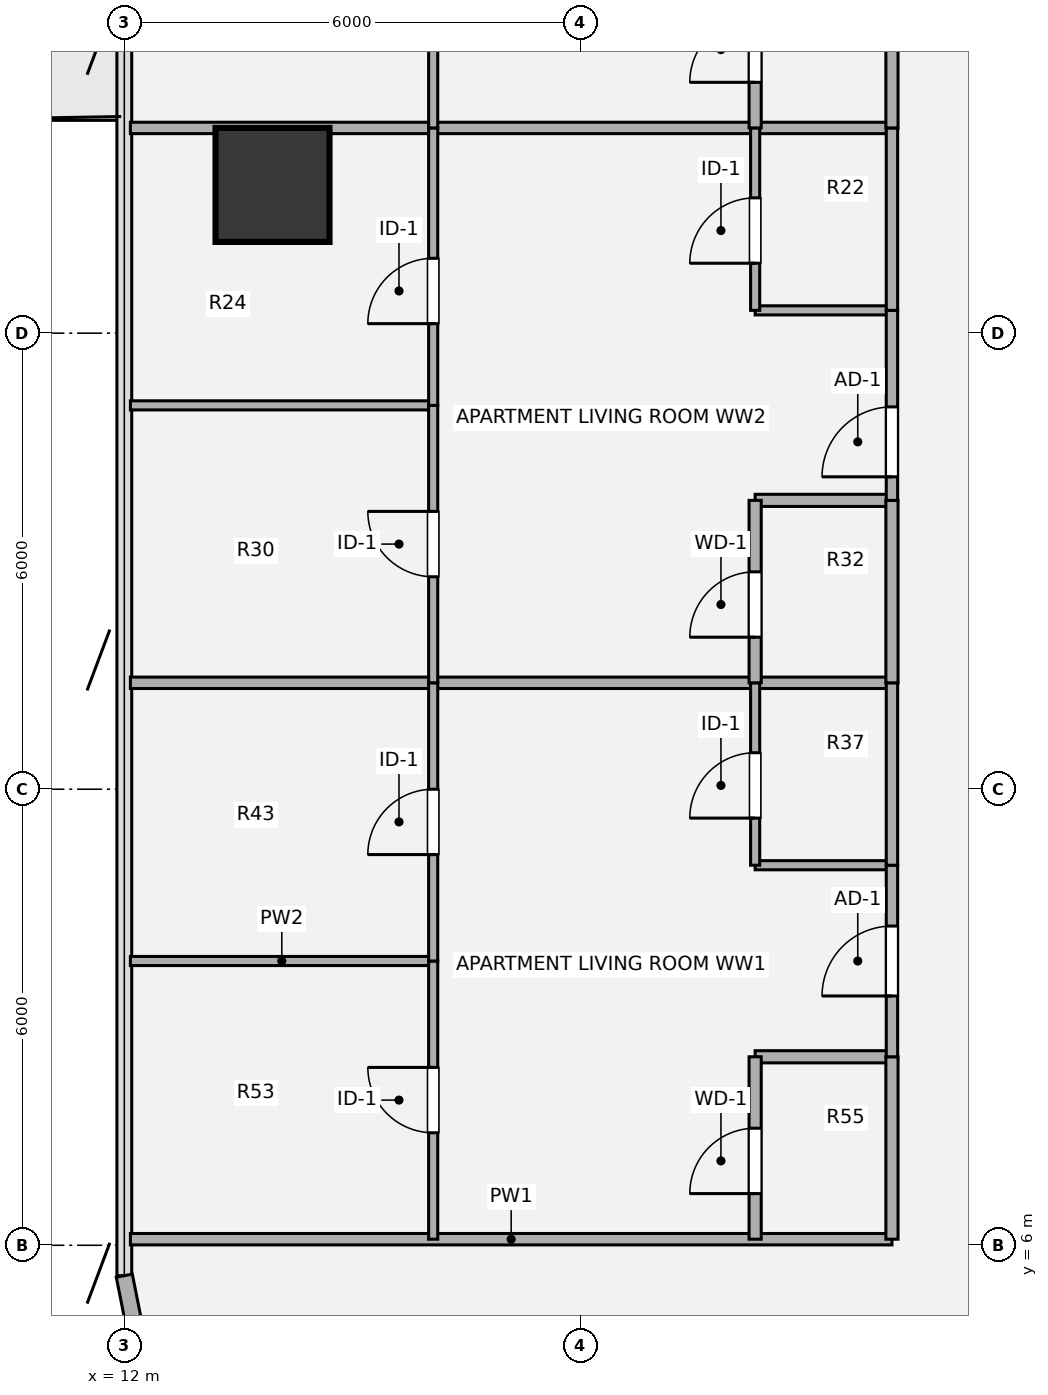
"""IFC4 building model, lengths in metres.
Left out: names, types, materials, properties, quantities, classifications, styles, units other than length and angle.
Written with IfcOpenShell. Run it as: python <this file> out.ifc"""

import sys

from ifc_helpers import new_model, si_unit, direction, frame, frame_2d, origin, origin_2d, place, context, subcontext, project, spatial, rectangle, hollow_circle, extrude, source, transform, mapped, element, fill, save


model = new_model("IFC4")
c1 = context("Model", 3, precision=1e-05, world=origin(), true_north=direction((0.0, 1.0)))
c2 = subcontext(c1, "Body", "Model", "MODEL_VIEW")
j1 = project(units=[si_unit("LENGTHUNIT", "METRE"), si_unit("PLANEANGLEUNIT", "RADIAN")], contexts=[c1])
p1 = place(None, origin())
s1 = spatial("IfcSite", under=j1, at=p1, CompositionType="ELEMENT")
p2 = place(p1, origin())
s2 = spatial("IfcBuilding", under=s1, at=p2, CompositionType="ELEMENT")
p3 = place(p2, frame((0.0, 0.0, 30.78)))
s3 = spatial("IfcBuildingStorey", under=s2, at=p3, CompositionType="ELEMENT", Elevation=30.78)
m1 = source(origin(), c2, "Body", "SweptSolid", [
    extrude(hollow_circle(Radius=0.75, WallThickness=0.05, at=origin_2d()), origin(), (0.0, 0.0, 1.0), 3.78),
])
p4 = place(p3, frame((13.95, 19.95, 0.0), z_axis=(0.0, 0.0, 1.0), x_axis=(1.0, 0.0, 0.0)))
e1 = element("IfcColumn", 1, at=p4, inside=s3, PredefinedType="COLUMN", context=c2, shape_type="MappedRepresentation", body=[
    mapped(m1, transform((0.0, 0.0, 0.0), x_axis=(1.0, 0.0, 0.0), y_axis=(0.0, 1.0, 0.0), z_axis=(0.0, 0.0, 1.0), scale=1.0)),
])
p5 = place(p3, frame((12.244, 4.375, 0.0), z_axis=(0.0, 0.0, 1.0), x_axis=(-0.195138390419, 0.980775717779, 0.0)))
e2 = element("IfcWall", 2, at=p5, inside=s3, PredefinedType="SOLIDWALL", context=c2, shape_type="SweptSolid", body=[
    extrude(rectangle(XDim=1.249, YDim=0.215, at=frame_2d((0.624, 0.0))), origin(), (0.0, 0.0, 1.0), 3.53),
])
p6 = place(p3, frame((12.08, 6.08, 0.0), z_axis=(0.0, 0.0, 1.0), x_axis=(1.0, 0.0, 0.0)))
e3 = element("IfcWall", 3, at=p6, inside=s3, PredefinedType="PARTITIONING", context=c2, shape_type="SweptSolid", body=[
    extrude(rectangle(XDim=10.02, YDim=0.15, at=frame_2d((5.01, 0.0))), origin(), (0.0, 0.0, 1.0), 3.5),
])
p7 = place(p3, frame((20.3, 8.48, 0.0), z_axis=(0.0, 0.0, 1.0), x_axis=(1.0, 0.0, 0.0)))
e4 = element("IfcWall", 4, at=p7, inside=s3, PredefinedType="PLUMBINGWALL", context=c2, shape_type="SweptSolid", body=[
    extrude(rectangle(XDim=1.8, YDim=0.16, at=frame_2d((0.9, 0.0))), origin(), (0.0, 0.0, 1.0), 3.5),
])
p8 = place(p3, frame((12.08, 9.74, 0.0), z_axis=(0.0, 0.0, 1.0), x_axis=(1.0, 0.0, 0.0)))
e5 = element("IfcWall", 5, at=p8, inside=s3, PredefinedType="PARTITIONING", context=c2, shape_type="SweptSolid", body=[
    extrude(rectangle(XDim=3.984, YDim=0.12, at=frame_2d((1.992, 0.0))), origin(), (0.0, 0.0, 1.0), 3.5),
])
p9 = place(p3, frame((20.3, 11.0, 0.0), z_axis=(0.0, 0.0, 1.0), x_axis=(1.0, 0.0, 0.0)))
e6 = element("IfcWall", 6, at=p9, inside=s3, PredefinedType="PARTITIONING", context=c2, shape_type="SweptSolid", body=[
    extrude(rectangle(XDim=1.8, YDim=0.12, at=frame_2d((0.9, 0.0))), origin(), (0.0, 0.0, 1.0), 3.5),
])
p10 = place(p3, frame((12.08, 13.4, 0.0), z_axis=(0.0, 0.0, 1.0), x_axis=(1.0, 0.0, 0.0)))
e7 = element("IfcWall", 7, at=p10, inside=s3, PredefinedType="PARTITIONING", context=c2, shape_type="SweptSolid", body=[
    extrude(rectangle(XDim=10.02, YDim=0.15, at=frame_2d((5.01, 0.0))), origin(), (0.0, 0.0, 1.0), 3.5),
])
p11 = place(p3, frame((20.3, 15.8, 0.0), z_axis=(0.0, 0.0, 1.0), x_axis=(1.0, 0.0, 0.0)))
e8 = element("IfcWall", 8, at=p11, inside=s3, PredefinedType="PLUMBINGWALL", context=c2, shape_type="SweptSolid", body=[
    extrude(rectangle(XDim=1.8, YDim=0.16, at=frame_2d((0.9, 0.0))), origin(), (0.0, 0.0, 1.0), 3.5),
])
p12 = place(p3, frame((12.08, 17.05, 0.0), z_axis=(0.0, 0.0, 1.0), x_axis=(1.0, 0.0, 0.0)))
e9 = element("IfcWall", 9, at=p12, inside=s3, PredefinedType="PARTITIONING", context=c2, shape_type="SweptSolid", body=[
    extrude(rectangle(XDim=3.984, YDim=0.12, at=frame_2d((1.992, 0.0))), origin(), (0.0, 0.0, 1.0), 3.5),
])
p13 = place(p3, frame((20.3, 18.3, 0.0), z_axis=(0.0, 0.0, 1.0), x_axis=(1.0, 0.0, 0.0)))
e10 = element("IfcWall", 10, at=p13, inside=s3, PredefinedType="PARTITIONING", context=c2, shape_type="SweptSolid", body=[
    extrude(rectangle(XDim=1.8, YDim=0.12, at=frame_2d((0.9, 0.0))), origin(), (0.0, 0.0, 1.0), 2.715),
])
p14 = place(p3, frame((12.08, 20.7, 0.0), z_axis=(0.0, 0.0, 1.0), x_axis=(1.0, 0.0, 0.0)))
e11 = element("IfcWall", 11, at=p14, inside=s3, PredefinedType="PARTITIONING", context=c2, shape_type="SweptSolid", body=[
    extrude(rectangle(XDim=10.02, YDim=0.15, at=frame_2d((5.01, 0.0))), origin(), (0.0, 0.0, 1.0), 2.982),
])
p15 = place(p3, frame((16.064, 6.08, 0.0), z_axis=(0.0, 0.0, 1.0), x_axis=(0.0, 1.0, 0.0)))
e12 = element("IfcWall", 12, at=p15, inside=s3, PredefinedType="PARTITIONING", context=c2, shape_type="SweptSolid", body=[
    extrude(rectangle(XDim=3.66, YDim=0.12, at=frame_2d((1.83, 0.0))), origin(), (0.0, 0.0, 1.0), 3.5),
])
p16 = place(p15, frame((1.4, 0.0, 0.0)))
e13 = element("IfcOpeningElement", 13, at=p16, cuts=e12, PredefinedType="OPENING", context=c2, shape_type="SweptSolid", body=[
    extrude(rectangle(XDim=0.86, YDim=2.1, at=origin_2d()), frame((0.43, 0.07, 1.05), z_axis=(0.0, -1.0, 0.0), x_axis=(1.0, 0.0, 0.0)), (0.0, 0.0, 1.0), 0.14),
])
p17 = place(p3, frame((16.064, 9.74, 0.0), z_axis=(0.0, 0.0, 1.0), x_axis=(0.0, 1.0, 0.0)))
e14 = element("IfcWall", 14, at=p17, inside=s3, PredefinedType="PARTITIONING", context=c2, shape_type="SweptSolid", body=[
    extrude(rectangle(XDim=3.66, YDim=0.12, at=frame_2d((1.83, 0.0))), origin(), (0.0, 0.0, 1.0), 3.5),
])
p18 = place(p17, frame((1.4, 0.0, 0.0)))
e15 = element("IfcOpeningElement", 15, at=p18, cuts=e14, PredefinedType="OPENING", context=c2, shape_type="SweptSolid", body=[
    extrude(rectangle(XDim=0.86, YDim=2.1, at=origin_2d()), frame((0.43, 0.07, 1.05), z_axis=(0.0, -1.0, 0.0), x_axis=(1.0, 0.0, 0.0)), (0.0, 0.0, 1.0), 0.14),
])
p19 = place(p3, frame((16.064, 13.4, 0.0), z_axis=(0.0, 0.0, 1.0), x_axis=(0.0, 1.0, 0.0)))
e16 = element("IfcWall", 16, at=p19, inside=s3, PredefinedType="PARTITIONING", context=c2, shape_type="SweptSolid", body=[
    extrude(rectangle(XDim=3.65, YDim=0.12, at=frame_2d((1.825, 0.0))), origin(), (0.0, 0.0, 1.0), 3.5),
])
p20 = place(p19, frame((1.395, 0.0, 0.0)))
e17 = element("IfcOpeningElement", 17, at=p20, cuts=e16, PredefinedType="OPENING", context=c2, shape_type="SweptSolid", body=[
    extrude(rectangle(XDim=0.86, YDim=2.1, at=origin_2d()), frame((0.43, 0.07, 1.05), z_axis=(0.0, -1.0, 0.0), x_axis=(1.0, 0.0, 0.0)), (0.0, 0.0, 1.0), 0.14),
])
p21 = place(p3, frame((16.064, 17.05, 0.0), z_axis=(0.0, 0.0, 1.0), x_axis=(0.0, 1.0, 0.0)))
e18 = element("IfcWall", 18, at=p21, inside=s3, PredefinedType="PARTITIONING", context=c2, shape_type="SweptSolid", body=[
    extrude(rectangle(XDim=3.65, YDim=0.12, at=frame_2d((1.825, 0.0))), origin(), (0.0, 0.0, 1.0), 3.5),
])
p22 = place(p21, frame((1.075, 0.0, 0.0)))
e19 = element("IfcOpeningElement", 19, at=p22, cuts=e18, PredefinedType="OPENING", context=c2, shape_type="SweptSolid", body=[
    extrude(rectangle(XDim=0.86, YDim=2.1, at=origin_2d()), frame((0.43, 0.07, 1.05), z_axis=(0.0, -1.0, 0.0), x_axis=(1.0, 0.0, 0.0)), (0.0, 0.0, 1.0), 0.14),
])
p23 = place(p3, frame((16.064, 20.7, 0.0), z_axis=(0.0, 0.0, 1.0), x_axis=(0.0, 1.0, 0.0)))
e20 = element("IfcWall", 20, at=p23, inside=s3, PredefinedType="PARTITIONING", context=c2, shape_type="SweptSolid", body=[
    extrude(rectangle(XDim=3.7, YDim=0.12, at=frame_2d((1.85, 0.0))), origin(), (0.0, 0.0, 1.0), 3.5),
])
p24 = place(p23, frame((1.42, 0.0, 0.0)))
e21 = element("IfcOpeningElement", 21, at=p24, cuts=e20, PredefinedType="OPENING", context=c2, shape_type="SweptSolid", body=[
    extrude(rectangle(XDim=0.86, YDim=2.1, at=origin_2d()), frame((0.43, 0.07, 1.05), z_axis=(0.0, -1.0, 0.0), x_axis=(1.0, 0.0, 0.0)), (0.0, 0.0, 1.0), 0.14),
])
p25 = place(p3, frame((20.3, 6.08, 0.0), z_axis=(0.0, 0.0, 1.0), x_axis=(0.0, 1.0, 0.0)))
e22 = element("IfcWall", 22, at=p25, inside=s3, PredefinedType="PLUMBINGWALL", context=c2, shape_type="SweptSolid", body=[
    extrude(rectangle(XDim=2.4, YDim=0.16, at=frame_2d((1.2, 0.0))), origin(), (0.0, 0.0, 1.0), 3.5),
])
p26 = place(p25, frame((0.6, 0.0, 0.0)))
e23 = element("IfcOpeningElement", 23, at=p26, cuts=e22, PredefinedType="OPENING", context=c2, shape_type="SweptSolid", body=[
    extrude(rectangle(XDim=0.86, YDim=2.1, at=origin_2d()), frame((0.43, 0.09, 1.05), z_axis=(0.0, -1.0, 0.0), x_axis=(1.0, 0.0, 0.0)), (0.0, 0.0, 1.0), 0.18),
])
p27 = place(p3, frame((20.3, 11.0, 0.0), z_axis=(0.0, 0.0, 1.0), x_axis=(0.0, 1.0, 0.0)))
e24 = element("IfcWall", 24, at=p27, inside=s3, PredefinedType="PARTITIONING", context=c2, shape_type="SweptSolid", body=[
    extrude(rectangle(XDim=2.4, YDim=0.12, at=frame_2d((1.2, 0.0))), origin(), (0.0, 0.0, 1.0), 3.5),
])
p28 = place(p27, frame((0.62, 0.0, 0.0)))
e25 = element("IfcOpeningElement", 25, at=p28, cuts=e24, PredefinedType="OPENING", context=c2, shape_type="SweptSolid", body=[
    extrude(rectangle(XDim=0.86, YDim=2.1, at=origin_2d()), frame((0.43, 0.07, 1.05), z_axis=(0.0, -1.0, 0.0), x_axis=(1.0, 0.0, 0.0)), (0.0, 0.0, 1.0), 0.14),
])
p29 = place(p3, frame((20.3, 13.4, 0.0), z_axis=(0.0, 0.0, 1.0), x_axis=(0.0, 1.0, 0.0)))
e26 = element("IfcWall", 26, at=p29, inside=s3, PredefinedType="PLUMBINGWALL", context=c2, shape_type="SweptSolid", body=[
    extrude(rectangle(XDim=2.4, YDim=0.16, at=frame_2d((1.2, 0.0))), origin(), (0.0, 0.0, 1.0), 3.5),
])
p30 = place(p29, frame((0.6, 0.0, 0.0)))
e27 = element("IfcOpeningElement", 27, at=p30, cuts=e26, PredefinedType="OPENING", context=c2, shape_type="SweptSolid", body=[
    extrude(rectangle(XDim=0.86, YDim=2.1, at=origin_2d()), frame((0.43, 0.09, 1.05), z_axis=(0.0, -1.0, 0.0), x_axis=(1.0, 0.0, 0.0)), (0.0, 0.0, 1.0), 0.18),
])
p31 = place(p3, frame((20.3, 18.3, 0.0), z_axis=(0.0, 0.0, 1.0), x_axis=(0.0, 1.0, 0.0)))
e28 = element("IfcWall", 28, at=p31, inside=s3, PredefinedType="PARTITIONING", context=c2, shape_type="SweptSolid", body=[
    extrude(rectangle(XDim=2.4, YDim=0.12, at=frame_2d((1.2, 0.0))), origin(), (0.0, 0.0, 1.0), 3.5),
])
p32 = place(p31, frame((0.62, 0.0, 0.0)))
e29 = element("IfcOpeningElement", 29, at=p32, cuts=e28, PredefinedType="OPENING", context=c2, shape_type="SweptSolid", body=[
    extrude(rectangle(XDim=0.86, YDim=2.1, at=origin_2d()), frame((0.43, 0.07, 1.05), z_axis=(0.0, -1.0, 0.0), x_axis=(1.0, 0.0, 0.0)), (0.0, 0.0, 1.0), 0.14),
])
p33 = place(p3, frame((20.3, 20.7, 0.0), z_axis=(0.0, 0.0, 1.0), x_axis=(0.0, 1.0, 0.0)))
e30 = element("IfcWall", 30, at=p33, inside=s3, PredefinedType="PLUMBINGWALL", context=c2, shape_type="SweptSolid", body=[
    extrude(rectangle(XDim=2.4, YDim=0.16, at=frame_2d((1.2, 0.0))), origin(), (0.0, 0.0, 1.0), 3.5),
])
p34 = place(p33, frame((0.6, 0.0, 0.0)))
e31 = element("IfcOpeningElement", 31, at=p34, cuts=e30, PredefinedType="OPENING", context=c2, shape_type="SweptSolid", body=[
    extrude(rectangle(XDim=0.86, YDim=2.1, at=origin_2d()), frame((0.43, 0.09, 1.05), z_axis=(0.0, -1.0, 0.0), x_axis=(1.0, 0.0, 0.0)), (0.0, 0.0, 1.0), 0.18),
])
p35 = place(p3, frame((22.1, 6.08, 0.0), z_axis=(0.0, 0.0, 1.0), x_axis=(0.0, 1.0, 0.0)))
e32 = element("IfcWall", 32, at=p35, inside=s3, PredefinedType="PLUMBINGWALL", context=c2, shape_type="SweptSolid", body=[
    extrude(rectangle(XDim=2.4, YDim=0.16, at=frame_2d((1.2, 0.0))), origin(), (0.0, 0.0, 1.0), 3.5),
])
p36 = place(p3, frame((22.1, 8.48, 0.0), z_axis=(0.0, 0.0, 1.0), x_axis=(0.0, 1.0, 0.0)))
e33 = element("IfcWall", 33, at=p36, inside=s3, PredefinedType="PARTITIONING", context=c2, shape_type="SweptSolid", body=[
    extrude(rectangle(XDim=2.52, YDim=0.15, at=frame_2d((1.26, 0.0))), origin(), (0.0, 0.0, 1.0), 3.5),
])
p37 = place(p36, frame((0.8, 0.0, 0.0)))
e34 = element("IfcOpeningElement", 34, at=p37, cuts=e33, PredefinedType="OPENING", context=c2, shape_type="SweptSolid", body=[
    extrude(rectangle(XDim=0.92, YDim=2.1, at=origin_2d()), frame((0.46, 0.085, 1.05), z_axis=(0.0, -1.0, 0.0), x_axis=(1.0, 0.0, 0.0)), (0.0, 0.0, 1.0), 0.17),
])
p38 = place(p3, frame((22.1, 11.0, 0.0), z_axis=(0.0, 0.0, 1.0), x_axis=(0.0, 1.0, 0.0)))
e35 = element("IfcWall", 35, at=p38, inside=s3, PredefinedType="PARTITIONING", context=c2, shape_type="SweptSolid", body=[
    extrude(rectangle(XDim=2.4, YDim=0.15, at=frame_2d((1.2, 0.0))), origin(), (0.0, 0.0, 1.0), 3.5),
])
p39 = place(p3, frame((22.1, 13.4, 0.0), z_axis=(0.0, 0.0, 1.0), x_axis=(0.0, 1.0, 0.0)))
e36 = element("IfcWall", 36, at=p39, inside=s3, PredefinedType="PLUMBINGWALL", context=c2, shape_type="SweptSolid", body=[
    extrude(rectangle(XDim=2.4, YDim=0.16, at=frame_2d((1.2, 0.0))), origin(), (0.0, 0.0, 1.0), 3.5),
])
p40 = place(p3, frame((22.1, 15.8, 0.0), z_axis=(0.0, 0.0, 1.0), x_axis=(0.0, 1.0, 0.0)))
e37 = element("IfcWall", 37, at=p40, inside=s3, PredefinedType="PARTITIONING", context=c2, shape_type="SweptSolid", body=[
    extrude(rectangle(XDim=2.5, YDim=0.15, at=frame_2d((1.25, 0.0))), origin(), (0.0, 0.0, 1.0), 3.5),
])
p41 = place(p40, frame((0.31, 0.0, 0.0)))
e38 = element("IfcOpeningElement", 38, at=p41, cuts=e37, PredefinedType="OPENING", context=c2, shape_type="SweptSolid", body=[
    extrude(rectangle(XDim=0.92, YDim=2.1, at=origin_2d()), frame((0.46, 0.085, 1.05), z_axis=(0.0, -1.0, 0.0), x_axis=(1.0, 0.0, 0.0)), (0.0, 0.0, 1.0), 0.17),
])
p42 = place(p3, frame((22.1, 18.3, 0.0), z_axis=(0.0, 0.0, 1.0), x_axis=(0.0, 1.0, 0.0)))
e39 = element("IfcWall", 39, at=p42, inside=s3, PredefinedType="PARTITIONING", context=c2, shape_type="SweptSolid", body=[
    extrude(rectangle(XDim=2.4, YDim=0.15, at=frame_2d((1.2, 0.0))), origin(), (0.0, 0.0, 1.0), 3.5),
])
p43 = place(p3, frame((22.1, 20.7, 0.0), z_axis=(0.0, 0.0, 1.0), x_axis=(0.0, 1.0, 0.0)))
e40 = element("IfcWall", 40, at=p43, inside=s3, PredefinedType="PLUMBINGWALL", context=c2, shape_type="SweptSolid", body=[
    extrude(rectangle(XDim=2.4, YDim=0.16, at=frame_2d((1.2, 0.0))), origin(), (0.0, 0.0, 1.0), 3.5),
])
m2 = source(origin(), c2, "Body", "SweptSolid", [
    extrude(rectangle(XDim=0.86, YDim=2.1, at=origin_2d()), frame((0.43, 0.025, 1.05), z_axis=(0.0, -1.0, 0.0), x_axis=(1.0, 0.0, 0.0)), (0.0, 0.0, 1.0), 0.05),
])
p44 = place(p16, origin())
e41 = element("IfcDoor", 41, at=p44, inside=s3, OperationType="SINGLE_SWING_RIGHT", PredefinedType="DOOR", context=c2, shape_type="MappedRepresentation", body=[
    mapped(m2, transform((0.0, 0.0, 0.0), x_axis=(1.0, 0.0, 0.0), y_axis=(0.0, 1.0, 0.0), z_axis=(0.0, 0.0, 1.0), scale=1.0)),
])
fill(e13, e41)
p45 = place(p18, origin())
e42 = element("IfcDoor", 42, at=p45, inside=s3, OperationType="SINGLE_SWING_LEFT", PredefinedType="DOOR", context=c2, shape_type="MappedRepresentation", body=[
    mapped(m2, transform((0.0, 0.0, 0.0), x_axis=(1.0, 0.0, 0.0), y_axis=(0.0, 1.0, 0.0), z_axis=(0.0, 0.0, 1.0), scale=1.0)),
])
fill(e15, e42)
p46 = place(p20, origin())
e43 = element("IfcDoor", 43, at=p46, inside=s3, OperationType="SINGLE_SWING_RIGHT", PredefinedType="DOOR", context=c2, shape_type="MappedRepresentation", body=[
    mapped(m2, transform((0.0, 0.0, 0.0), x_axis=(1.0, 0.0, 0.0), y_axis=(0.0, 1.0, 0.0), z_axis=(0.0, 0.0, 1.0), scale=1.0)),
])
fill(e17, e43)
p47 = place(p22, origin())
e44 = element("IfcDoor", 44, at=p47, inside=s3, OperationType="SINGLE_SWING_LEFT", PredefinedType="DOOR", context=c2, shape_type="MappedRepresentation", body=[
    mapped(m2, transform((0.0, 0.0, 0.0), x_axis=(1.0, 0.0, 0.0), y_axis=(0.0, 1.0, 0.0), z_axis=(0.0, 0.0, 1.0), scale=1.0)),
])
fill(e19, e44)
m3 = source(origin(), c2, "Body", "SweptSolid", [
    extrude(rectangle(XDim=0.86, YDim=2.1, at=origin_2d()), frame((0.43, 0.025, 1.05), z_axis=(0.0, -1.0, 0.0), x_axis=(1.0, 0.0, 0.0)), (0.0, 0.0, 1.0), 0.05),
])
p48 = place(p26, origin())
e45 = element("IfcDoor", 45, at=p48, inside=s3, OperationType="SINGLE_SWING_LEFT", PredefinedType="DOOR", context=c2, shape_type="MappedRepresentation", body=[
    mapped(m3, transform((0.0, 0.0, 0.0), x_axis=(1.0, 0.0, 0.0), y_axis=(0.0, 1.0, 0.0), z_axis=(0.0, 0.0, 1.0), scale=1.0)),
])
fill(e23, e45)
p49 = place(p28, origin())
e46 = element("IfcDoor", 46, at=p49, inside=s3, OperationType="SINGLE_SWING_LEFT", PredefinedType="DOOR", context=c2, shape_type="MappedRepresentation", body=[
    mapped(m2, transform((0.0, 0.0, 0.0), x_axis=(1.0, 0.0, 0.0), y_axis=(0.0, 1.0, 0.0), z_axis=(0.0, 0.0, 1.0), scale=1.0)),
])
fill(e25, e46)
p50 = place(p30, origin())
e47 = element("IfcDoor", 47, at=p50, inside=s3, OperationType="SINGLE_SWING_LEFT", PredefinedType="DOOR", context=c2, shape_type="MappedRepresentation", body=[
    mapped(m3, transform((0.0, 0.0, 0.0), x_axis=(1.0, 0.0, 0.0), y_axis=(0.0, 1.0, 0.0), z_axis=(0.0, 0.0, 1.0), scale=1.0)),
])
fill(e27, e47)
p51 = place(p32, origin())
e48 = element("IfcDoor", 48, at=p51, inside=s3, OperationType="SINGLE_SWING_LEFT", PredefinedType="DOOR", context=c2, shape_type="MappedRepresentation", body=[
    mapped(m2, transform((0.0, 0.0, 0.0), x_axis=(1.0, 0.0, 0.0), y_axis=(0.0, 1.0, 0.0), z_axis=(0.0, 0.0, 1.0), scale=1.0)),
])
fill(e29, e48)
p52 = place(p34, origin())
e49 = element("IfcDoor", 49, at=p52, inside=s3, OperationType="SINGLE_SWING_LEFT", PredefinedType="DOOR", context=c2, shape_type="MappedRepresentation", body=[
    mapped(m3, transform((0.0, 0.0, 0.0), x_axis=(1.0, 0.0, 0.0), y_axis=(0.0, 1.0, 0.0), z_axis=(0.0, 0.0, 1.0), scale=1.0)),
])
fill(e31, e49)
m4 = source(origin(), c2, "Body", "SweptSolid", [
    extrude(rectangle(XDim=0.92, YDim=2.1, at=origin_2d()), frame((0.46, 0.025, 1.05), z_axis=(0.0, -1.0, 0.0), x_axis=(1.0, 0.0, 0.0)), (0.0, 0.0, 1.0), 0.05),
])
p53 = place(p37, origin())
e50 = element("IfcDoor", 50, at=p53, inside=s3, OperationType="SINGLE_SWING_LEFT", PredefinedType="DOOR", context=c2, shape_type="MappedRepresentation", body=[
    mapped(m4, transform((0.0, 0.0, 0.0), x_axis=(1.0, 0.0, 0.0), y_axis=(0.0, 1.0, 0.0), z_axis=(0.0, 0.0, 1.0), scale=1.0)),
])
fill(e34, e50)
p54 = place(p41, origin())
e51 = element("IfcDoor", 51, at=p54, inside=s3, OperationType="SINGLE_SWING_LEFT", PredefinedType="DOOR", context=c2, shape_type="MappedRepresentation", body=[
    mapped(m4, transform((0.0, 0.0, 0.0), x_axis=(1.0, 0.0, 0.0), y_axis=(0.0, 1.0, 0.0), z_axis=(0.0, 0.0, 1.0), scale=1.0)),
])
fill(e38, e51)
save(model, sys.argv[1])
